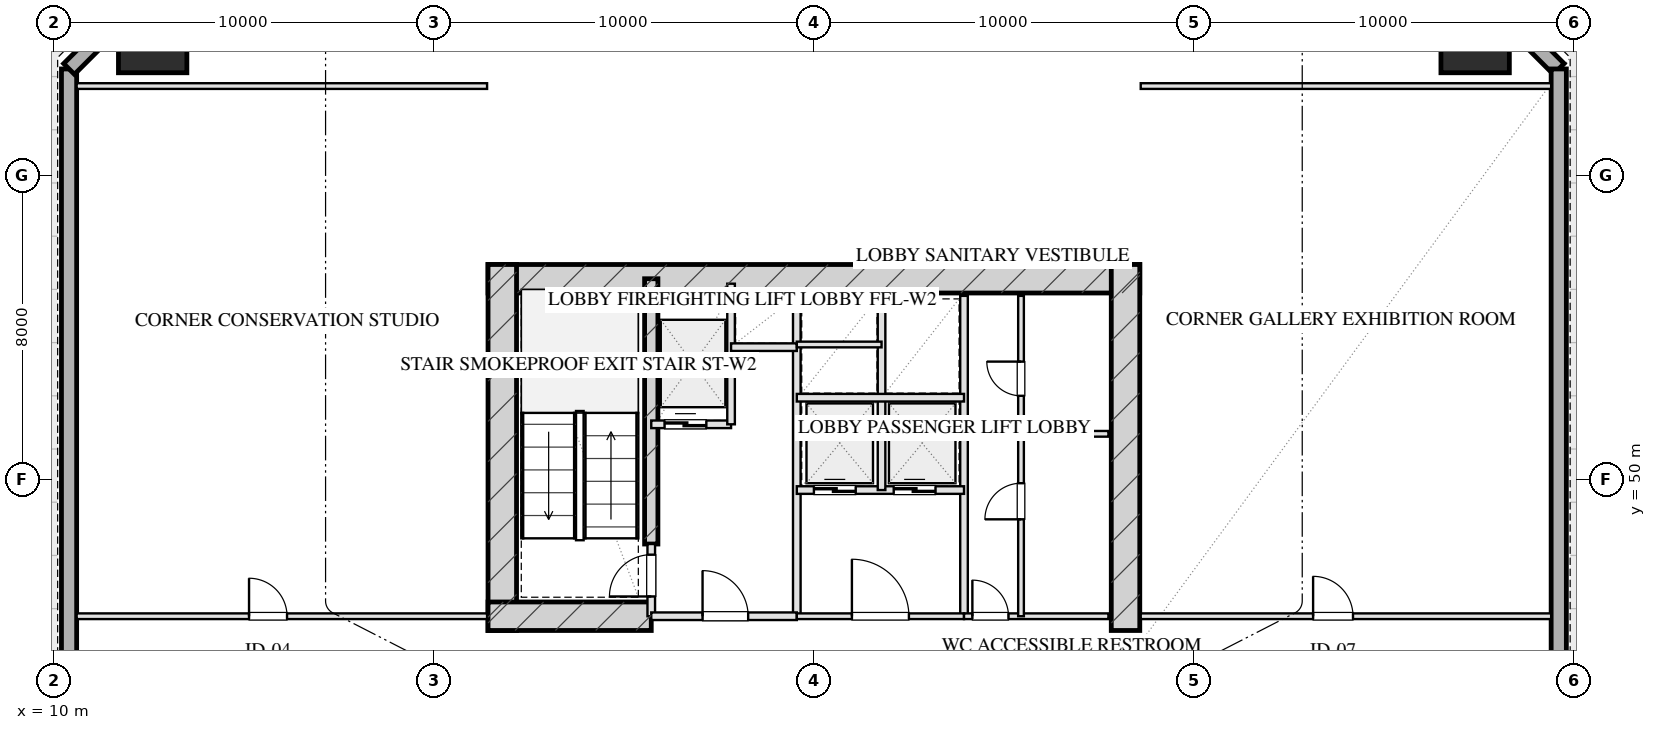
"""IFC4 building model, lengths in metres.
Left out: names, types, materials, properties, quantities, classifications, styles, units other than length and angle.
Written with IfcOpenShell. Run it as: python <this file> out.ifc"""

import sys

from ifc_helpers import new_model, si_unit, direction, frame, frame_2d, origin, origin_2d, place, context, subcontext, project, spatial, rectangle, hollow_rectangle, extrude, element, fill, save


model = new_model("IFC4")
c1 = context("Model", 3, precision=1e-05, world=origin(), true_north=direction((0.0, 1.0)))
c2 = subcontext(c1, "Body", "Model", "MODEL_VIEW")
j1 = project(units=[si_unit("LENGTHUNIT", "METRE"), si_unit("PLANEANGLEUNIT", "RADIAN")], contexts=[c1])
p1 = place(None, origin())
s1 = spatial("IfcSite", under=j1, at=p1, CompositionType="ELEMENT")
p2 = place(p1, origin())
s2 = spatial("IfcBuilding", under=s1, at=p2, CompositionType="ELEMENT")
p3 = place(p2, frame((0.0, 0.0, 26.0)))
s3 = spatial("IfcBuildingStorey", under=s2, at=p3, CompositionType="ELEMENT", Elevation=26.0)
p4 = place(p3, frame((21.425, 55.28, 0.0), z_axis=(0.0, 0.0, 1.0), x_axis=(1.0, 0.0, 0.0)))
e1 = element("IfcWall", 1, at=p4, inside=s3, PredefinedType="SHEAR", context=c2, shape_type="SweptSolid", body=[
    extrude(rectangle(XDim=17.15, YDim=0.75, at=frame_2d((8.575, 0.0))), origin(), (0.0, 0.0, 1.0), 4.0),
])
for number, where, z_axis, x_axis in (
    (2, (21.8, 46.025, 0.0), (0.0, 0.0, 1.0), (0.0, 1.0, 0.0)),
    (3, (38.2, 46.025, 0.0), (0.0, 0.0, 1.0), (0.0, 1.0, 0.0)),
):
    element("IfcWall", number, at=place(p3, frame(where, z_axis=z_axis, x_axis=x_axis)), inside=s3, PredefinedType="SHEAR", context=c2, shape_type="SweptSolid", body=[
        extrude(rectangle(XDim=9.63, YDim=0.75, at=frame_2d((4.815, 0.0))), origin(), (0.0, 0.0, 1.0), 4.0),
    ])
p5 = place(p3, frame((25.72, 48.3, 0.0), z_axis=(0.0, 0.0, 1.0), x_axis=(0.0, 1.0, 0.0)))
e4 = element("IfcWall", 4, at=p5, inside=s3, PredefinedType="SHEAR", context=c2, shape_type="SweptSolid", body=[
    extrude(rectangle(XDim=6.98, YDim=0.35, at=frame_2d((3.49, 0.0))), origin(), (0.0, 0.0, 1.0), 4.0),
])
p6 = place(p3, frame((21.425, 46.4, 0.0), z_axis=(0.0, 0.0, 1.0), x_axis=(1.0, 0.0, 0.0)))
e5 = element("IfcWall", 5, at=p6, inside=s3, PredefinedType="SHEAR", context=c2, shape_type="SweptSolid", body=[
    extrude(rectangle(XDim=4.295, YDim=0.75, at=frame_2d((2.147, 0.0))), origin(), (0.0, 0.0, 1.0), 4.0),
])
for number, where, z_axis, x_axis in (
    (6, (47.4, 61.6, 0.0), (0.0, 0.0, 1.0), (1.0, 0.0, 0.0)),
    (7, (12.6, 61.6, 0.0), (0.0, 0.0, 1.0), (1.0, 0.0, 0.0)),
):
    element("IfcColumn", number, at=place(p3, frame(where, z_axis=z_axis, x_axis=x_axis)), inside=s3, PredefinedType="COLUMN", context=c2, shape_type="SweptSolid", body=[
        extrude(hollow_rectangle(XDim=1.8, YDim=1.8, WallThickness=0.06, at=origin_2d()), origin(), (0.0, 0.0, 1.0), 4.001),
    ])
p7 = place(p3, frame((10.4, 7.2, 0.0), z_axis=(0.0, 0.0, 1.0), x_axis=(0.0, 1.0, 0.0)))
e8 = element("IfcWall", 8, at=p7, inside=s3, PredefinedType="SOLIDWALL", context=c2, shape_type="SweptSolid", body=[
    extrude(rectangle(XDim=53.6, YDim=0.4, at=frame_2d((26.8, 0.0))), origin(), (0.0, 0.0, 1.0), 3.16),
])
p8 = place(p7, frame((22.95, 0.0, 0.75)))
e9 = element("IfcOpeningElement", 9, at=p8, cuts=e8, PredefinedType="OPENING", context=c2, shape_type="SweptSolid", body=[
    extrude(rectangle(XDim=2.5, YDim=1.75, at=frame_2d((1.25, 0.875))), frame((0.0, 0.21, 0.0), z_axis=(0.0, -1.0, 0.0), x_axis=(1.0, 0.0, 0.0)), (0.0, 0.0, 1.0), 0.42),
])
p9 = place(p7, frame((28.15, 0.0, 0.75)))
e10 = element("IfcOpeningElement", 10, at=p9, cuts=e8, PredefinedType="OPENING", context=c2, shape_type="SweptSolid", body=[
    extrude(rectangle(XDim=2.5, YDim=1.75, at=frame_2d((1.25, 0.875))), frame((0.0, 0.21, 0.0), z_axis=(0.0, -1.0, 0.0), x_axis=(1.0, 0.0, 0.0)), (0.0, 0.0, 1.0), 0.42),
])
for number, where, z_axis, x_axis in (
    (11, (10.4, 60.8, 0.0), (0.0, 0.0, 1.0), (0.707, 0.707, 0.0)),
    (12, (46.6, 63.8, 0.0), (0.0, 0.0, 1.0), (0.707, -0.707, 0.0)),
):
    element("IfcWall", number, at=place(p3, frame(where, z_axis=z_axis, x_axis=x_axis)), inside=s3, PredefinedType="SOLIDWALL", context=c2, shape_type="SweptSolid", body=[
        extrude(rectangle(XDim=4.243, YDim=0.4, at=frame_2d((2.121, 0.0))), origin(), (0.0, 0.0, 1.0), 3.16),
    ])
p10 = place(p3, frame((49.6, 60.8, 0.0), z_axis=(0.0, 0.0, 1.0), x_axis=(0.0, -1.0, 0.0)))
e13 = element("IfcWall", 13, at=p10, inside=s3, PredefinedType="SOLIDWALL", context=c2, shape_type="SweptSolid", body=[
    extrude(rectangle(XDim=53.6, YDim=0.4, at=frame_2d((26.8, 0.0))), origin(), (0.0, 0.0, 1.0), 3.16),
])
p11 = place(p10, frame((28.15, 0.0, 0.75)))
e14 = element("IfcOpeningElement", 14, at=p11, cuts=e13, PredefinedType="OPENING", context=c2, shape_type="SweptSolid", body=[
    extrude(rectangle(XDim=2.5, YDim=1.75, at=frame_2d((1.25, 0.875))), frame((0.0, 0.21, 0.0), z_axis=(0.0, -1.0, 0.0), x_axis=(1.0, 0.0, 0.0)), (0.0, 0.0, 1.0), 0.42),
])
p12 = place(p10, frame((22.95, 0.0, 0.75)))
e15 = element("IfcOpeningElement", 15, at=p12, cuts=e13, PredefinedType="OPENING", context=c2, shape_type="SweptSolid", body=[
    extrude(rectangle(XDim=2.5, YDim=1.75, at=frame_2d((1.25, 0.875))), frame((0.0, 0.21, 0.0), z_axis=(0.0, -1.0, 0.0), x_axis=(1.0, 0.0, 0.0)), (0.0, 0.0, 1.0), 0.42),
])
p13 = place(p3, frame((25.72, 46.4, 0.0), z_axis=(0.0, 0.0, 1.0), x_axis=(0.0, 1.0, 0.0)))
e16 = element("IfcWall", 16, at=p13, inside=s3, PredefinedType="PARTITIONING", context=c2, shape_type="SweptSolid", body=[
    extrude(rectangle(XDim=1.9, YDim=0.2, at=frame_2d((0.95, 0.0))), origin(), (0.0, 0.0, 1.0), 3.725),
])
p14 = place(p13, frame((0.52, 0.0, 0.0)))
e17 = element("IfcOpeningElement", 17, at=p14, cuts=e16, PredefinedType="OPENING", context=c2, shape_type="SweptSolid", body=[
    extrude(rectangle(XDim=1.1, YDim=2.05, at=frame_2d((0.55, 1.025))), frame((0.0, 0.11, 0.0), z_axis=(0.0, -1.0, 0.0), x_axis=(1.0, 0.0, 0.0)), (0.0, 0.0, 1.0), 0.22),
])
p15 = place(p3, frame((29.55, 46.4, 0.0), z_axis=(0.0, 0.0, 1.0), x_axis=(0.0, 1.0, 0.0)))
e18 = element("IfcWall", 18, at=p15, inside=s3, PredefinedType="PARTITIONING", context=c2, shape_type="SweptSolid", body=[
    extrude(rectangle(XDim=8.43, YDim=0.2, at=frame_2d((4.215, 0.0))), origin(), (0.0, 0.0, 1.0), 3.725),
])
p16 = place(p3, frame((25.72, 46.4, 0.0), z_axis=(0.0, 0.0, 1.0), x_axis=(1.0, 0.0, 0.0)))
e19 = element("IfcWall", 19, at=p16, inside=s3, PredefinedType="PARTITIONING", context=c2, shape_type="SweptSolid", body=[
    extrude(rectangle(XDim=3.83, YDim=0.2, at=frame_2d((1.915, 0.0))), origin(), (0.0, 0.0, 1.0), 3.725),
])
p17 = place(p16, frame((1.35, 0.0, 0.0)))
e20 = element("IfcOpeningElement", 20, at=p17, cuts=e19, PredefinedType="OPENING", context=c2, shape_type="SweptSolid", body=[
    extrude(rectangle(XDim=1.2, YDim=2.05, at=frame_2d((0.6, 1.025))), frame((0.0, 0.11, 0.0), z_axis=(0.0, -1.0, 0.0), x_axis=(1.0, 0.0, 0.0)), (0.0, 0.0, 1.0), 0.22),
])
p18 = place(p3, frame((25.72, 51.45, 0.0), z_axis=(0.0, 0.0, 1.0), x_axis=(1.0, 0.0, 0.0)))
e21 = element("IfcWall", 21, at=p18, inside=s3, PredefinedType="PARTITIONING", context=c2, shape_type="SweptSolid", body=[
    extrude(rectangle(XDim=2.1, YDim=0.2, at=frame_2d((1.05, 0.0))), origin(), (0.0, 0.0, 1.0), 3.725),
])
p19 = place(p18, frame((0.35, 0.0, 0.0)))
e22 = element("IfcOpeningElement", 22, at=p19, cuts=e21, PredefinedType="OPENING", context=c2, shape_type="SweptSolid", body=[
    extrude(rectangle(XDim=1.1, YDim=2.05, at=frame_2d((0.55, 1.025))), frame((0.0, 0.11, 0.0), z_axis=(0.0, -1.0, 0.0), x_axis=(1.0, 0.0, 0.0)), (0.0, 0.0, 1.0), 0.22),
])
p20 = place(p3, frame((27.82, 51.45, 0.0), z_axis=(0.0, 0.0, 1.0), x_axis=(0.0, 1.0, 0.0)))
e23 = element("IfcWall", 23, at=p20, inside=s3, PredefinedType="PARTITIONING", context=c2, shape_type="SweptSolid", body=[
    extrude(rectangle(XDim=3.7, YDim=0.2, at=frame_2d((1.85, 0.0))), origin(), (0.0, 0.0, 1.0), 3.725),
])
p21 = place(p3, frame((27.82, 53.48, 0.0), z_axis=(0.0, 0.0, 1.0), x_axis=(1.0, 0.0, 0.0)))
e24 = element("IfcWall", 24, at=p21, inside=s3, PredefinedType="PARTITIONING", context=c2, shape_type="SweptSolid", body=[
    extrude(rectangle(XDim=1.73, YDim=0.2, at=frame_2d((0.865, 0.0))), origin(), (0.0, 0.0, 1.0), 3.725),
])
p22 = place(p3, frame((33.95, 46.4, 0.0), z_axis=(0.0, 0.0, 1.0), x_axis=(0.0, 1.0, 0.0)))
e25 = element("IfcWall", 25, at=p22, inside=s3, PredefinedType="PARTITIONING", context=c2, shape_type="SweptSolid", body=[
    extrude(rectangle(XDim=8.43, YDim=0.2, at=frame_2d((4.215, 0.0))), origin(), (0.0, 0.0, 1.0), 3.725),
])
p23 = place(p3, frame((29.55, 46.4, 0.0), z_axis=(0.0, 0.0, 1.0), x_axis=(1.0, 0.0, 0.0)))
e26 = element("IfcWall", 26, at=p23, inside=s3, PredefinedType="PARTITIONING", context=c2, shape_type="SweptSolid", body=[
    extrude(rectangle(XDim=4.4, YDim=0.15, at=frame_2d((2.2, 0.0))), origin(), (0.0, 0.0, 1.0), 3.725),
])
p24 = place(p23, frame((1.45, 0.0, 0.0)))
e27 = element("IfcOpeningElement", 27, at=p24, cuts=e26, PredefinedType="OPENING", context=c2, shape_type="SweptSolid", body=[
    extrude(rectangle(XDim=1.5, YDim=2.05, at=frame_2d((0.75, 1.025))), frame((0.0, 0.085, 0.0), z_axis=(0.0, -1.0, 0.0), x_axis=(1.0, 0.0, 0.0)), (0.0, 0.0, 1.0), 0.17),
])
p25 = place(p3, frame((29.55, 49.72, 0.0), z_axis=(0.0, 0.0, 1.0), x_axis=(1.0, 0.0, 0.0)))
e28 = element("IfcWall", 28, at=p25, inside=s3, PredefinedType="PARTITIONING", context=c2, shape_type="SweptSolid", body=[
    extrude(rectangle(XDim=4.4, YDim=0.2, at=frame_2d((2.2, 0.0))), origin(), (0.0, 0.0, 1.0), 3.725),
])
p26 = place(p25, frame((0.45, 0.0, 0.0)))
e29 = element("IfcOpeningElement", 29, at=p26, cuts=e28, PredefinedType="OPENING", context=c2, shape_type="SweptSolid", body=[
    extrude(rectangle(XDim=1.1, YDim=2.05, at=frame_2d((0.55, 1.025))), frame((0.0, 0.11, 0.0), z_axis=(0.0, -1.0, 0.0), x_axis=(1.0, 0.0, 0.0)), (0.0, 0.0, 1.0), 0.22),
])
p27 = place(p25, frame((2.55, 0.0, 0.0)))
e30 = element("IfcOpeningElement", 30, at=p27, cuts=e28, PredefinedType="OPENING", context=c2, shape_type="SweptSolid", body=[
    extrude(rectangle(XDim=1.1, YDim=2.05, at=frame_2d((0.55, 1.025))), frame((0.0, 0.11, 0.0), z_axis=(0.0, -1.0, 0.0), x_axis=(1.0, 0.0, 0.0)), (0.0, 0.0, 1.0), 0.22),
])
p28 = place(p3, frame((31.78, 49.72, 0.0), z_axis=(0.0, 0.0, 1.0), x_axis=(0.0, 1.0, 0.0)))
e31 = element("IfcWall", 31, at=p28, inside=s3, PredefinedType="PARTITIONING", context=c2, shape_type="SweptSolid", body=[
    extrude(rectangle(XDim=5.11, YDim=0.2, at=frame_2d((2.555, 0.0))), origin(), (0.0, 0.0, 1.0), 3.725),
])
p29 = place(p3, frame((29.55, 52.15, 0.0), z_axis=(0.0, 0.0, 1.0), x_axis=(1.0, 0.0, 0.0)))
e32 = element("IfcWall", 32, at=p29, inside=s3, PredefinedType="PARTITIONING", context=c2, shape_type="SweptSolid", body=[
    extrude(rectangle(XDim=4.4, YDim=0.2, at=frame_2d((2.2, 0.0))), origin(), (0.0, 0.0, 1.0), 3.725),
])
p30 = place(p3, frame((29.55, 53.55, 0.0), z_axis=(0.0, 0.0, 1.0), x_axis=(1.0, 0.0, 0.0)))
e33 = element("IfcWall", 33, at=p30, inside=s3, PredefinedType="PARTITIONING", context=c2, shape_type="SweptSolid", body=[
    extrude(rectangle(XDim=2.23, YDim=0.15, at=frame_2d((1.115, 0.0))), origin(), (0.0, 0.0, 1.0), 3.725),
])
p31 = place(p3, frame((33.95, 46.4, 0.0), z_axis=(0.0, 0.0, 1.0), x_axis=(1.0, 0.0, 0.0)))
e34 = element("IfcWall", 34, at=p31, inside=s3, PredefinedType="PARTITIONING", context=c2, shape_type="SweptSolid", body=[
    extrude(rectangle(XDim=3.8, YDim=0.15, at=frame_2d((1.9, 0.0))), origin(), (0.0, 0.0, 1.0), 3.725),
])
p32 = place(p31, frame((0.22, 0.0, 0.0)))
e35 = element("IfcOpeningElement", 35, at=p32, cuts=e34, PredefinedType="OPENING", context=c2, shape_type="SweptSolid", body=[
    extrude(rectangle(XDim=0.95, YDim=2.05, at=frame_2d((0.475, 1.025))), frame((0.0, 0.085, 0.0), z_axis=(0.0, -1.0, 0.0), x_axis=(1.0, 0.0, 0.0)), (0.0, 0.0, 1.0), 0.17),
])
p33 = place(p3, frame((35.45, 46.4, 0.0), z_axis=(0.0, 0.0, 1.0), x_axis=(0.0, 1.0, 0.0)))
e36 = element("IfcWall", 36, at=p33, inside=s3, PredefinedType="PARTITIONING", context=c2, shape_type="SweptSolid", body=[
    extrude(rectangle(XDim=8.43, YDim=0.15, at=frame_2d((4.215, 0.0))), origin(), (0.0, 0.0, 1.0), 3.365),
])
p34 = place(p33, frame((2.55, 0.0, 0.0)))
e37 = element("IfcOpeningElement", 37, at=p34, cuts=e36, PredefinedType="OPENING", context=c2, shape_type="SweptSolid", body=[
    extrude(rectangle(XDim=0.95, YDim=2.05, at=frame_2d((0.475, 1.025))), frame((0.0, 0.085, 0.0), z_axis=(0.0, -1.0, 0.0), x_axis=(1.0, 0.0, 0.0)), (0.0, 0.0, 1.0), 0.17),
])
p35 = place(p33, frame((5.8, 0.0, 0.0)))
e38 = element("IfcOpeningElement", 38, at=p35, cuts=e36, PredefinedType="OPENING", context=c2, shape_type="SweptSolid", body=[
    extrude(rectangle(XDim=0.9, YDim=2.05, at=frame_2d((0.45, 1.025))), frame((0.0, 0.085, 0.0), z_axis=(0.0, -1.0, 0.0), x_axis=(1.0, 0.0, 0.0)), (0.0, 0.0, 1.0), 0.17),
])
p36 = place(p3, frame((35.45, 51.2, 0.0), z_axis=(0.0, 0.0, 1.0), x_axis=(1.0, 0.0, 0.0)))
e39 = element("IfcWall", 39, at=p36, inside=s3, PredefinedType="PARTITIONING", context=c2, shape_type="SweptSolid", body=[
    extrude(rectangle(XDim=2.3, YDim=0.15, at=frame_2d((1.15, 0.0))), origin(), (0.0, 0.0, 1.0), 3.725),
])
p37 = place(p3, frame((10.6, 60.35, 0.0), z_axis=(0.0, 0.0, 1.0), x_axis=(1.0, 0.0, 0.0)))
e40 = element("IfcWall", 40, at=p37, inside=s3, PredefinedType="PARTITIONING", context=c2, shape_type="SweptSolid", body=[
    extrude(rectangle(XDim=10.8, YDim=0.15, at=frame_2d((5.4, 0.0))), origin(), (0.0, 0.0, 1.0), 3.725),
])
p38 = place(p3, frame((10.6, 46.4, 0.0), z_axis=(0.0, 0.0, 1.0), x_axis=(1.0, 0.0, 0.0)))
e41 = element("IfcWall", 41, at=p38, inside=s3, PredefinedType="PARTITIONING", context=c2, shape_type="SweptSolid", body=[
    extrude(rectangle(XDim=10.8, YDim=0.15, at=frame_2d((5.4, 0.0))), origin(), (0.0, 0.0, 1.0), 3.725),
])
p39 = place(p38, frame((4.536, 0.0, 0.0)))
e42 = element("IfcOpeningElement", 42, at=p39, cuts=e41, PredefinedType="OPENING", context=c2, shape_type="SweptSolid", body=[
    extrude(rectangle(XDim=1.0, YDim=2.05, at=frame_2d((0.5, 1.025))), frame((0.0, 0.085, 0.0), z_axis=(0.0, -1.0, 0.0), x_axis=(1.0, 0.0, 0.0)), (0.0, 0.0, 1.0), 0.17),
])
p40 = place(p3, frame((38.6, 60.35, 0.0), z_axis=(0.0, 0.0, 1.0), x_axis=(1.0, 0.0, 0.0)))
e43 = element("IfcWall", 43, at=p40, inside=s3, PredefinedType="PARTITIONING", context=c2, shape_type="SweptSolid", body=[
    extrude(rectangle(XDim=10.8, YDim=0.15, at=frame_2d((5.4, 0.0))), origin(), (0.0, 0.0, 1.0), 3.725),
])
p41 = place(p3, frame((38.6, 46.4, 0.0), z_axis=(0.0, 0.0, 1.0), x_axis=(1.0, 0.0, 0.0)))
e44 = element("IfcWall", 44, at=p41, inside=s3, PredefinedType="PARTITIONING", context=c2, shape_type="SweptSolid", body=[
    extrude(rectangle(XDim=10.8, YDim=0.15, at=frame_2d((5.4, 0.0))), origin(), (0.0, 0.0, 1.0), 3.725),
])
p42 = place(p41, frame((4.536, 0.0, 0.0)))
e45 = element("IfcOpeningElement", 45, at=p42, cuts=e44, PredefinedType="OPENING", context=c2, shape_type="SweptSolid", body=[
    extrude(rectangle(XDim=1.05, YDim=2.05, at=frame_2d((0.525, 1.025))), frame((0.0, 0.085, 0.0), z_axis=(0.0, -1.0, 0.0), x_axis=(1.0, 0.0, 0.0)), (0.0, 0.0, 1.0), 0.17),
])
p43 = place(p14, origin())
e46 = element("IfcDoor", 46, at=p43, inside=s3, OperationType="SINGLE_SWING_LEFT", PredefinedType="DOOR", context=c2, shape_type="SweptSolid", body=[
    extrude(rectangle(XDim=1.1, YDim=2.05, at=frame_2d((0.55, 1.025))), frame((0.0, 0.025, 0.0), z_axis=(0.0, -1.0, 0.0), x_axis=(1.0, 0.0, 0.0)), (0.0, 0.0, 1.0), 0.05),
])
fill(e17, e46)
p44 = place(p17, origin())
e47 = element("IfcDoor", 47, at=p44, inside=s3, OperationType="SINGLE_SWING_LEFT", PredefinedType="DOOR", context=c2, shape_type="SweptSolid", body=[
    extrude(rectangle(XDim=1.2, YDim=2.05, at=frame_2d((0.6, 1.025))), frame((0.0, 0.025, 0.0), z_axis=(0.0, -1.0, 0.0), x_axis=(1.0, 0.0, 0.0)), (0.0, 0.0, 1.0), 0.05),
])
fill(e20, e47)
p45 = place(p19, origin())
e48 = element("IfcDoor", 48, at=p45, inside=s3, OperationType="DOUBLE_DOOR_SLIDING", PredefinedType="DOOR", context=c2, shape_type="SweptSolid", body=[
    extrude(rectangle(XDim=1.1, YDim=2.05, at=frame_2d((0.55, 1.025))), frame((0.0, 0.025, 0.0), z_axis=(0.0, -1.0, 0.0), x_axis=(1.0, 0.0, 0.0)), (0.0, 0.0, 1.0), 0.05),
])
fill(e22, e48)
p46 = place(p24, origin())
e49 = element("IfcDoor", 49, at=p46, inside=s3, OperationType="SINGLE_SWING_LEFT", PredefinedType="DOOR", context=c2, shape_type="SweptSolid", body=[
    extrude(rectangle(XDim=1.5, YDim=2.05, at=frame_2d((0.75, 1.025))), frame((0.0, 0.025, 0.0), z_axis=(0.0, -1.0, 0.0), x_axis=(1.0, 0.0, 0.0)), (0.0, 0.0, 1.0), 0.05),
])
fill(e27, e49)
p47 = place(p26, origin())
e50 = element("IfcDoor", 50, at=p47, inside=s3, OperationType="DOUBLE_DOOR_SLIDING", PredefinedType="DOOR", context=c2, shape_type="SweptSolid", body=[
    extrude(rectangle(XDim=1.1, YDim=2.05, at=frame_2d((0.55, 1.025))), frame((0.0, 0.025, 0.0), z_axis=(0.0, -1.0, 0.0), x_axis=(1.0, 0.0, 0.0)), (0.0, 0.0, 1.0), 0.05),
])
fill(e29, e50)
p48 = place(p27, origin())
e51 = element("IfcDoor", 51, at=p48, inside=s3, OperationType="DOUBLE_DOOR_SLIDING", PredefinedType="DOOR", context=c2, shape_type="SweptSolid", body=[
    extrude(rectangle(XDim=1.1, YDim=2.05, at=frame_2d((0.55, 1.025))), frame((0.0, 0.025, 0.0), z_axis=(0.0, -1.0, 0.0), x_axis=(1.0, 0.0, 0.0)), (0.0, 0.0, 1.0), 0.05),
])
fill(e30, e51)
p49 = place(p32, origin())
e52 = element("IfcDoor", 52, at=p49, inside=s3, OperationType="SINGLE_SWING_LEFT", PredefinedType="DOOR", context=c2, shape_type="SweptSolid", body=[
    extrude(rectangle(XDim=0.95, YDim=2.05, at=frame_2d((0.475, 1.025))), frame((0.0, 0.025, 0.0), z_axis=(0.0, -1.0, 0.0), x_axis=(1.0, 0.0, 0.0)), (0.0, 0.0, 1.0), 0.05),
])
fill(e35, e52)
p50 = place(p34, origin())
e53 = element("IfcDoor", 53, at=p50, inside=s3, OperationType="SINGLE_SWING_LEFT", PredefinedType="DOOR", context=c2, shape_type="SweptSolid", body=[
    extrude(rectangle(XDim=0.95, YDim=2.05, at=frame_2d((0.475, 1.025))), frame((0.0, 0.025, 0.0), z_axis=(0.0, -1.0, 0.0), x_axis=(1.0, 0.0, 0.0)), (0.0, 0.0, 1.0), 0.05),
])
fill(e37, e53)
p51 = place(p35, origin())
e54 = element("IfcDoor", 54, at=p51, inside=s3, OperationType="SINGLE_SWING_RIGHT", PredefinedType="DOOR", context=c2, shape_type="SweptSolid", body=[
    extrude(rectangle(XDim=0.9, YDim=2.05, at=frame_2d((0.45, 1.025))), frame((0.0, 0.025, 0.0), z_axis=(0.0, -1.0, 0.0), x_axis=(1.0, 0.0, 0.0)), (0.0, 0.0, 1.0), 0.05),
])
fill(e38, e54)
p52 = place(p39, origin())
e55 = element("IfcDoor", 55, at=p52, inside=s3, OperationType="SINGLE_SWING_LEFT", PredefinedType="DOOR", context=c2, shape_type="SweptSolid", body=[
    extrude(rectangle(XDim=1.0, YDim=2.05, at=frame_2d((0.5, 1.025))), frame((0.0, 0.025, 0.0), z_axis=(0.0, -1.0, 0.0), x_axis=(1.0, 0.0, 0.0)), (0.0, 0.0, 1.0), 0.05),
])
fill(e42, e55)
p53 = place(p42, origin())
e56 = element("IfcDoor", 56, at=p53, inside=s3, OperationType="SINGLE_SWING_LEFT", PredefinedType="DOOR", context=c2, shape_type="SweptSolid", body=[
    extrude(rectangle(XDim=1.05, YDim=2.05, at=frame_2d((0.525, 1.025))), frame((0.0, 0.025, 0.0), z_axis=(0.0, -1.0, 0.0), x_axis=(1.0, 0.0, 0.0)), (0.0, 0.0, 1.0), 0.05),
])
fill(e45, e56)
save(model, sys.argv[1])
